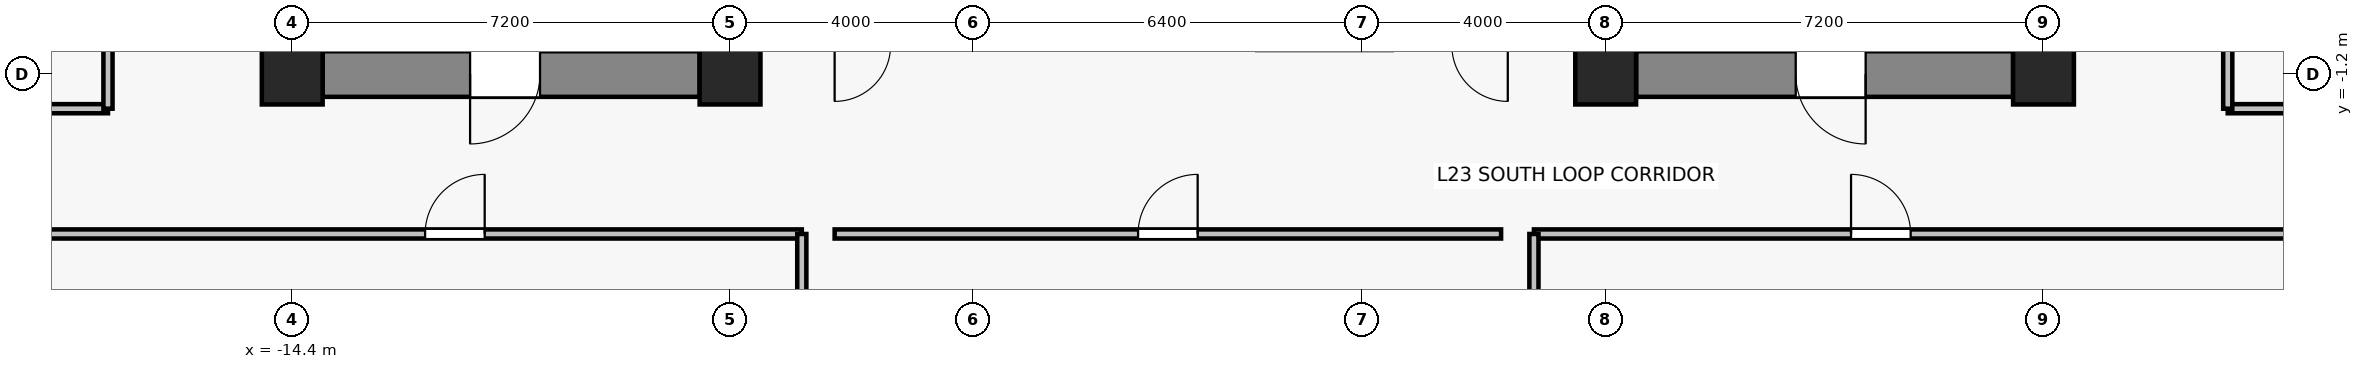
"""IFC4 building model, lengths in metres.
Left out: names, types, materials, properties, quantities, classifications, styles, units other than length and angle.
Written with IfcOpenShell. Run it as: python <this file> out.ifc"""

import sys

from ifc_helpers import new_model, si_unit, direction, frame, frame_2d, origin, origin_2d, place, context, subcontext, project, spatial, rectangle, extrude, source, transform, mapped, element, fill, save


model = new_model("IFC4")
c1 = context("Model", 3, precision=1e-05, world=origin(), true_north=direction((0.0, 1.0)))
c2 = subcontext(c1, "Body", "Model", "MODEL_VIEW")
j1 = project(units=[si_unit("LENGTHUNIT", "METRE"), si_unit("PLANEANGLEUNIT", "RADIAN")], contexts=[c1])
p1 = place(None, origin())
s1 = spatial("IfcSite", under=j1, at=p1, CompositionType="ELEMENT")
p2 = place(p1, origin())
s2 = spatial("IfcBuilding", under=s1, at=p2, CompositionType="ELEMENT")
p3 = place(p2, frame((0.0, 0.0, 86.8)))
s3 = spatial("IfcBuildingStorey", under=s2, at=p3, CompositionType="ELEMENT", Elevation=86.8)
for number, where, z_axis, x_axis in (
    (1, (-14.4, -1.2, 0.0), (0.0, 0.0, 1.0), (1.0, 0.0, 0.0)),
    (2, (-7.2, -1.2, 0.0), (0.0, 0.0, 1.0), (1.0, 0.0, 0.0)),
    (3, (7.2, -1.2, 0.0), (0.0, 0.0, 1.0), (1.0, 0.0, 0.0)),
    (4, (14.4, -1.2, 0.0), (0.0, 0.0, 1.0), (1.0, 0.0, 0.0)),
):
    element("IfcColumn", number, at=place(p3, frame(where, z_axis=z_axis, x_axis=x_axis)), inside=s3, PredefinedType="COLUMN", context=c2, shape_type="SweptSolid", body=[
        extrude(rectangle(XDim=1.0, YDim=1.0, at=origin_2d()), origin(), (0.0, 0.0, 1.0), 3.3),
    ])
p4 = place(p3, frame((-7.7, -1.2, 0.0), z_axis=(0.0, 0.0, 1.0), x_axis=(-1.0, 0.0, 0.0)))
e5 = element("IfcWall", 5, at=p4, inside=s3, PredefinedType="SHEAR", context=c2, shape_type="SweptSolid", body=[
    extrude(rectangle(XDim=6.2, YDim=0.75, at=frame_2d((3.1, 0.0))), origin(), (0.0, 0.0, 1.0), 3.075),
])
p5 = place(p4, frame((2.625, 0.0, 0.0)))
e6 = element("IfcOpeningElement", 6, at=p5, cuts=e5, PredefinedType="OPENING", context=c2, shape_type="SweptSolid", body=[
    extrude(rectangle(XDim=1.15, YDim=2.15, at=frame_2d((0.575, 1.075))), frame((0.0, 0.385, 0.0), z_axis=(0.0, -1.0, 0.0), x_axis=(1.0, 0.0, 0.0)), (0.0, 0.0, 1.0), 0.77),
])
p6 = place(p3, frame((13.9, -1.2, 0.0), z_axis=(0.0, 0.0, 1.0), x_axis=(-1.0, 0.0, 0.0)))
e7 = element("IfcWall", 7, at=p6, inside=s3, PredefinedType="SHEAR", context=c2, shape_type="SweptSolid", body=[
    extrude(rectangle(XDim=6.2, YDim=0.75, at=frame_2d((3.1, 0.0))), origin(), (0.0, 0.0, 1.0), 3.075),
])
p7 = place(p6, frame((2.425, 0.0, 0.0)))
e8 = element("IfcOpeningElement", 8, at=p7, cuts=e7, PredefinedType="OPENING", context=c2, shape_type="SweptSolid", body=[
    extrude(rectangle(XDim=1.15, YDim=2.15, at=frame_2d((0.575, 1.075))), frame((0.0, 0.385, 0.0), z_axis=(0.0, -1.0, 0.0), x_axis=(1.0, 0.0, 0.0)), (0.0, 0.0, 1.0), 0.77),
])
p8 = place(p3, frame((-29.53, -3.83, 0.0), z_axis=(0.0, 0.0, 1.0), x_axis=(1.0, 0.0, 0.0)))
e9 = element("IfcWall", 9, at=p8, inside=s3, PredefinedType="PARTITIONING", context=c2, shape_type="SweptSolid", body=[
    extrude(rectangle(XDim=23.51, YDim=0.15, at=frame_2d((11.755, 0.0))), origin(), (0.0, 0.0, 1.0), 2.515),
])
p9 = place(p8, frame((17.315, 0.0, 0.0)))
e10 = element("IfcOpeningElement", 10, at=p9, cuts=e9, PredefinedType="OPENING", context=c2, shape_type="SweptSolid", body=[
    extrude(rectangle(XDim=0.98, YDim=2.15, at=frame_2d((0.49, 1.075))), frame((0.0, 0.085, 0.0), z_axis=(0.0, -1.0, 0.0), x_axis=(1.0, 0.0, 0.0)), (0.0, 0.0, 1.0), 0.17),
])
p10 = place(p3, frame((-6.02, -3.83, 0.0), z_axis=(0.0, 0.0, 1.0), x_axis=(0.0, -1.0, 0.0)))
e11 = element("IfcWall", 11, at=p10, inside=s3, PredefinedType="PARTITIONING", context=c2, shape_type="SweptSolid", body=[
    extrude(rectangle(XDim=13.8, YDim=0.15, at=frame_2d((6.9, 0.0))), origin(), (0.0, 0.0, 1.0), 2.515),
])
p11 = place(p3, frame((6.02, -3.83, 0.0), z_axis=(0.0, 0.0, 1.0), x_axis=(1.0, 0.0, 0.0)))
e12 = element("IfcWall", 12, at=p11, inside=s3, PredefinedType="PARTITIONING", context=c2, shape_type="SweptSolid", body=[
    extrude(rectangle(XDim=19.51, YDim=0.15, at=frame_2d((9.755, 0.0))), origin(), (0.0, 0.0, 1.0), 2.515),
])
p12 = place(p11, frame((5.215, 0.0, 0.0)))
e13 = element("IfcOpeningElement", 13, at=p12, cuts=e12, PredefinedType="OPENING", context=c2, shape_type="SweptSolid", body=[
    extrude(rectangle(XDim=0.98, YDim=2.15, at=frame_2d((0.49, 1.075))), frame((0.0, 0.085, 0.0), z_axis=(0.0, -1.0, 0.0), x_axis=(1.0, 0.0, 0.0)), (0.0, 0.0, 1.0), 0.17),
])
p13 = place(p3, frame((6.02, -17.63, 0.0), z_axis=(0.0, 0.0, 1.0), x_axis=(0.0, 1.0, 0.0)))
e14 = element("IfcWall", 14, at=p13, inside=s3, PredefinedType="PARTITIONING", context=c2, shape_type="SweptSolid", body=[
    extrude(rectangle(XDim=13.8, YDim=0.15, at=frame_2d((6.9, 0.0))), origin(), (0.0, 0.0, 1.0), 2.515),
])
p14 = place(p3, frame((-5.48, -3.83, 0.0), z_axis=(0.0, 0.0, 1.0), x_axis=(1.0, 0.0, 0.0)))
e15 = element("IfcWall", 15, at=p14, inside=s3, PredefinedType="PARTITIONING", context=c2, shape_type="SweptSolid", body=[
    extrude(rectangle(XDim=10.96, YDim=0.15, at=frame_2d((5.48, 0.0))), origin(), (0.0, 0.0, 1.0), 3.075),
])
p15 = place(p14, frame((4.99, 0.0, 0.0)))
e16 = element("IfcOpeningElement", 16, at=p15, cuts=e15, PredefinedType="OPENING", context=c2, shape_type="SweptSolid", body=[
    extrude(rectangle(XDim=0.98, YDim=2.15, at=frame_2d((0.49, 1.075))), frame((0.0, 0.085, 0.0), z_axis=(0.0, -1.0, 0.0), x_axis=(1.0, 0.0, 0.0)), (0.0, 0.0, 1.0), 0.17),
])
p16 = place(p3, frame((-17.43, -1.77, 0.0), z_axis=(0.0, 0.0, 1.0), x_axis=(-1.0, 0.0, 0.0)))
e17 = element("IfcWall", 17, at=p16, inside=s3, PredefinedType="PARTITIONING", context=c2, shape_type="SweptSolid", body=[
    extrude(rectangle(XDim=12.1, YDim=0.15, at=frame_2d((6.05, 0.0))), origin(), (0.0, 0.0, 1.0), 2.515),
])
p17 = place(p3, frame((-17.43, 13.88, 0.0), z_axis=(0.0, 0.0, 1.0), x_axis=(0.0, -1.0, 0.0)))
e18 = element("IfcWall", 18, at=p17, inside=s3, PredefinedType="PARTITIONING", context=c2, shape_type="SweptSolid", body=[
    extrude(rectangle(XDim=15.65, YDim=0.15, at=frame_2d((7.825, 0.0))), origin(), (0.0, 0.0, 1.0), 2.515),
])
p18 = place(p17, frame((7.335, 0.0, 0.0)))
e19 = element("IfcOpeningElement", 19, at=p18, cuts=e18, PredefinedType="OPENING", context=c2, shape_type="SweptSolid", body=[
    extrude(rectangle(XDim=0.98, YDim=2.15, at=frame_2d((0.49, 1.075))), frame((0.0, 0.085, 0.0), z_axis=(0.0, -1.0, 0.0), x_axis=(1.0, 0.0, 0.0)), (0.0, 0.0, 1.0), 0.17),
])
p19 = place(p3, frame((25.53, -1.77, 0.0), z_axis=(0.0, 0.0, 1.0), x_axis=(-1.0, 0.0, 0.0)))
e20 = element("IfcWall", 20, at=p19, inside=s3, PredefinedType="PARTITIONING", context=c2, shape_type="SweptSolid", body=[
    extrude(rectangle(XDim=8.1, YDim=0.15, at=frame_2d((4.05, 0.0))), origin(), (0.0, 0.0, 1.0), 2.515),
])
p20 = place(p3, frame((17.43, -1.77, 0.0), z_axis=(0.0, 0.0, 1.0), x_axis=(0.0, 1.0, 0.0)))
e21 = element("IfcWall", 21, at=p20, inside=s3, PredefinedType="PARTITIONING", context=c2, shape_type="SweptSolid", body=[
    extrude(rectangle(XDim=15.65, YDim=0.15, at=frame_2d((7.825, 0.0))), origin(), (0.0, 0.0, 1.0), 2.515),
])
p21 = place(p20, frame((7.335, 0.0, 0.0)))
e22 = element("IfcOpeningElement", 22, at=p21, cuts=e21, PredefinedType="OPENING", context=c2, shape_type="SweptSolid", body=[
    extrude(rectangle(XDim=0.98, YDim=2.15, at=frame_2d((0.49, 1.075))), frame((0.0, 0.085, 0.0), z_axis=(0.0, -1.0, 0.0), x_axis=(1.0, 0.0, 0.0)), (0.0, 0.0, 1.0), 0.17),
])
m1 = source(origin(), c2, "Body", "SweptSolid", [
    extrude(rectangle(XDim=1.15, YDim=2.15, at=frame_2d((0.575, 1.075))), frame((0.0, 0.025, 0.0), z_axis=(0.0, -1.0, 0.0), x_axis=(1.0, 0.0, 0.0)), (0.0, 0.0, 1.0), 0.05),
])
p22 = place(p5, origin())
e23 = element("IfcDoor", 23, at=p22, inside=s3, OperationType="SINGLE_SWING_RIGHT", PredefinedType="DOOR", context=c2, shape_type="MappedRepresentation", body=[
    mapped(m1, transform((0.0, 0.0, 0.0), x_axis=(1.0, 0.0, 0.0), y_axis=(0.0, 1.0, 0.0), z_axis=(0.0, 0.0, 1.0), scale=1.0)),
])
fill(e6, e23)
p23 = place(p7, origin())
e24 = element("IfcDoor", 24, at=p23, inside=s3, OperationType="SINGLE_SWING_LEFT", PredefinedType="DOOR", context=c2, shape_type="MappedRepresentation", body=[
    mapped(m1, transform((0.0, 0.0, 0.0), x_axis=(1.0, 0.0, 0.0), y_axis=(0.0, 1.0, 0.0), z_axis=(0.0, 0.0, 1.0), scale=1.0)),
])
fill(e8, e24)
m2 = source(origin(), c2, "Body", "SweptSolid", [
    extrude(rectangle(XDim=0.98, YDim=2.15, at=frame_2d((0.49, 1.075))), frame((0.0, 0.025, 0.0), z_axis=(0.0, -1.0, 0.0), x_axis=(1.0, 0.0, 0.0)), (0.0, 0.0, 1.0), 0.05),
])
p24 = place(p9, origin())
e25 = element("IfcDoor", 25, at=p24, inside=s3, OperationType="SINGLE_SWING_RIGHT", PredefinedType="DOOR", context=c2, shape_type="MappedRepresentation", body=[
    mapped(m2, transform((0.0, 0.0, 0.0), x_axis=(1.0, 0.0, 0.0), y_axis=(0.0, 1.0, 0.0), z_axis=(0.0, 0.0, 1.0), scale=1.0)),
])
fill(e10, e25)
p25 = place(p12, origin())
e26 = element("IfcDoor", 26, at=p25, inside=s3, OperationType="SINGLE_SWING_LEFT", PredefinedType="DOOR", context=c2, shape_type="MappedRepresentation", body=[
    mapped(m2, transform((0.0, 0.0, 0.0), x_axis=(1.0, 0.0, 0.0), y_axis=(0.0, 1.0, 0.0), z_axis=(0.0, 0.0, 1.0), scale=1.0)),
])
fill(e13, e26)
p26 = place(p15, origin())
e27 = element("IfcDoor", 27, at=p26, inside=s3, OperationType="SINGLE_SWING_RIGHT", PredefinedType="DOOR", context=c2, shape_type="MappedRepresentation", body=[
    mapped(m2, transform((0.0, 0.0, 0.0), x_axis=(1.0, 0.0, 0.0), y_axis=(0.0, 1.0, 0.0), z_axis=(0.0, 0.0, 1.0), scale=1.0)),
])
fill(e16, e27)
save(model, sys.argv[1])
